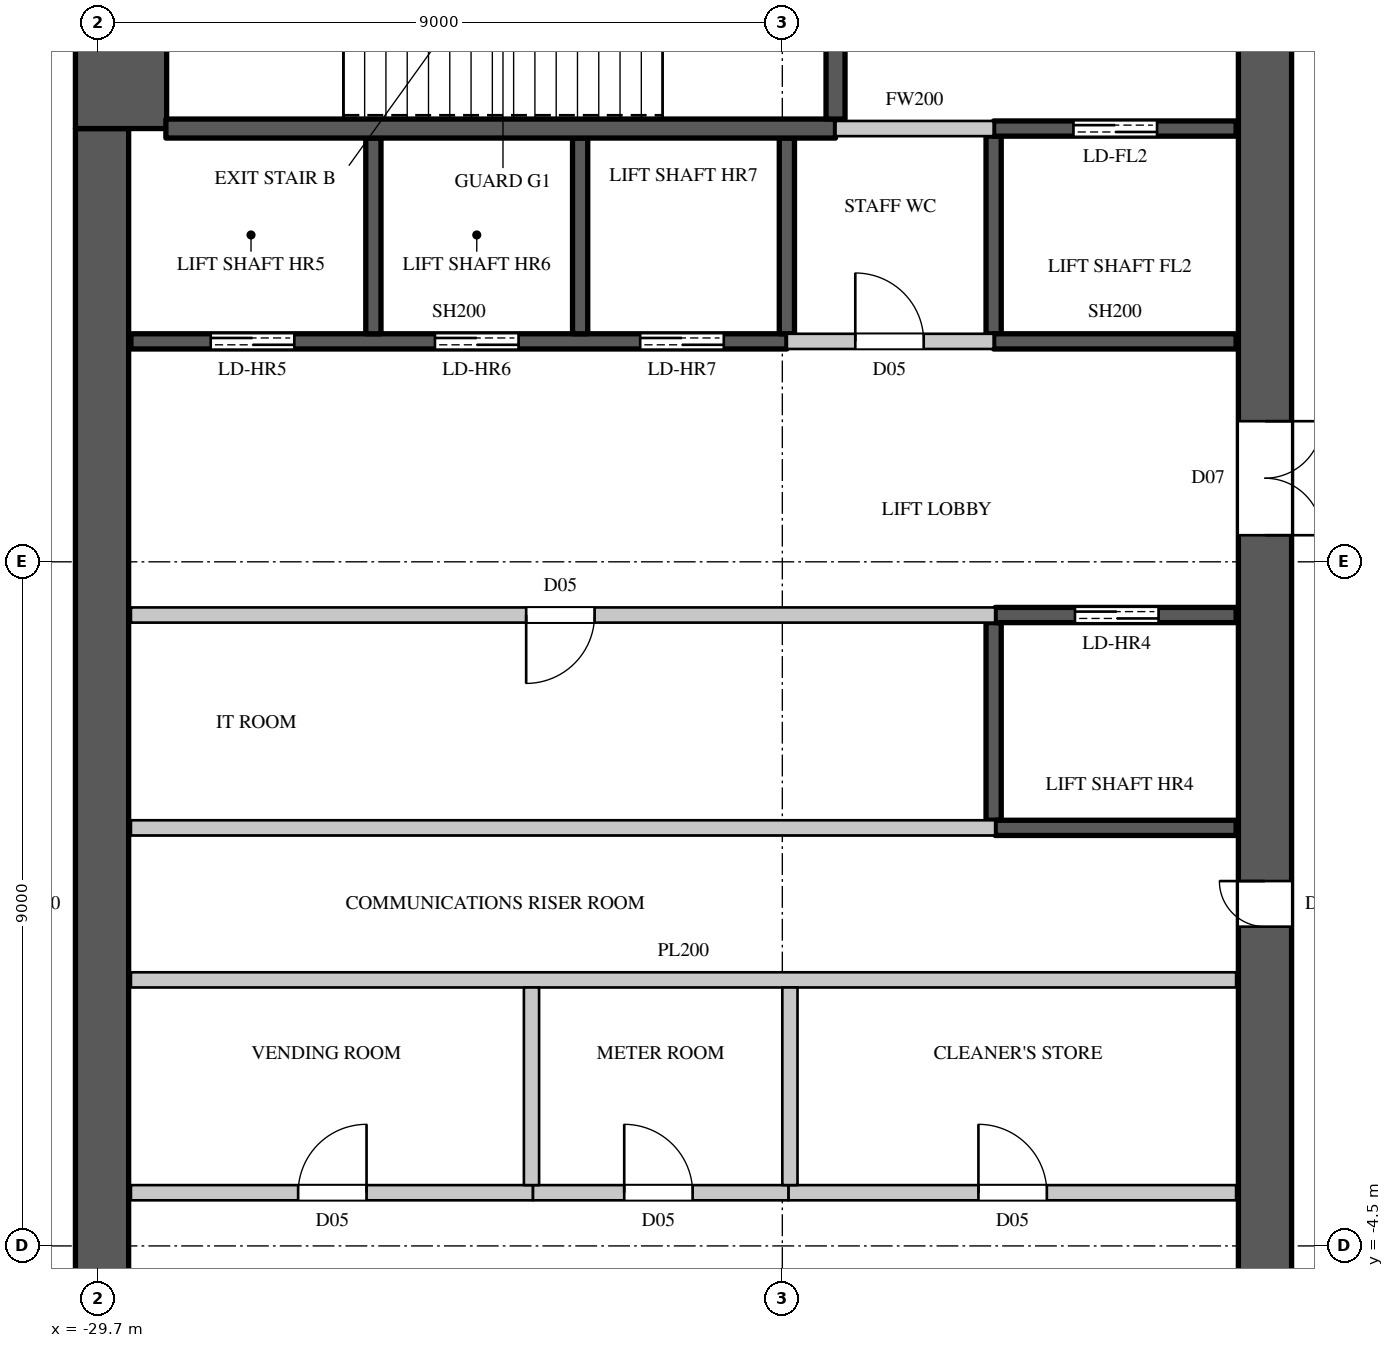
"""IFC4 building model, lengths in metres.
Left out: names, types, materials, properties, quantities, classifications, styles, units other than length and angle.
Written with IfcOpenShell. Run it as: python <this file> out.ifc"""

import sys

from ifc_helpers import new_model, si_unit, direction, frame, frame_2d, origin, place, context, subcontext, project, spatial, rectangle, extrude, element, fill, save


model = new_model("IFC4")
c1 = context("Model", 3, precision=1e-05, world=origin(), true_north=direction((0.0, 1.0)))
c2 = subcontext(c1, "Body", "Model", "MODEL_VIEW")
j1 = project(units=[si_unit("LENGTHUNIT", "METRE"), si_unit("PLANEANGLEUNIT", "RADIAN")], contexts=[c1])
p1 = place(None, origin())
s1 = spatial("IfcSite", under=j1, at=p1, CompositionType="ELEMENT")
p2 = place(p1, origin())
s2 = spatial("IfcBuilding", under=s1, at=p2, CompositionType="ELEMENT")
p3 = place(p2, frame((0.0, 0.0, 329.5)))
s3 = spatial("IfcBuildingStorey", under=s2, at=p3, CompositionType="ELEMENT", Elevation=329.5)
p4 = place(p3, frame((-14.35, -14.8, 0.0), z_axis=(0.0, 0.0, 1.0), x_axis=(0.0, 1.0, 0.0)))
e1 = element("IfcWall", 1, at=p4, inside=s3, PredefinedType="SHEAR", context=c2, shape_type="SweptSolid", body=[
    extrude(rectangle(XDim=29.6, YDim=0.7, at=frame_2d((14.8, 0.0))), origin(), (0.0, 0.0, 1.0), 5.5),
])
p5 = place(p4, frame((1.55, 0.0, 0.0)))
e2 = element("IfcOpeningElement", 2, at=p5, cuts=e1, PredefinedType="OPENING", context=c2, shape_type="SweptSolid", body=[
    extrude(rectangle(XDim=1.5, YDim=2.4, at=frame_2d((0.75, 1.2))), frame((0.0, 0.36, 0.0), z_axis=(0.0, -1.0, 0.0), x_axis=(1.0, 0.0, 0.0)), (0.0, 0.0, 1.0), 0.72),
])
p6 = place(p4, frame((26.55, 0.0, 0.0)))
e3 = element("IfcOpeningElement", 3, at=p6, cuts=e1, PredefinedType="OPENING", context=c2, shape_type="SweptSolid", body=[
    extrude(rectangle(XDim=1.5, YDim=2.4, at=frame_2d((0.75, 1.2))), frame((0.0, 0.36, 0.0), z_axis=(0.0, -1.0, 0.0), x_axis=(1.0, 0.0, 0.0)), (0.0, 0.0, 1.0), 0.72),
])
p7 = place(p4, frame((8.45, 0.0, 0.0)))
e4 = element("IfcOpeningElement", 4, at=p7, cuts=e1, PredefinedType="OPENING", context=c2, shape_type="SweptSolid", body=[
    extrude(rectangle(XDim=1.5, YDim=2.4, at=frame_2d((0.75, 1.2))), frame((0.0, 0.36, 0.0), z_axis=(0.0, -1.0, 0.0), x_axis=(1.0, 0.0, 0.0)), (0.0, 0.0, 1.0), 0.72),
])
p8 = place(p4, frame((19.65, 0.0, 0.0)))
e5 = element("IfcOpeningElement", 5, at=p8, cuts=e1, PredefinedType="OPENING", context=c2, shape_type="SweptSolid", body=[
    extrude(rectangle(XDim=1.5, YDim=2.4, at=frame_2d((0.75, 1.2))), frame((0.0, 0.36, 0.0), z_axis=(0.0, -1.0, 0.0), x_axis=(1.0, 0.0, 0.0)), (0.0, 0.0, 1.0), 0.72),
])
p9 = place(p4, frame((14.5, 0.0, 0.0)))
e6 = element("IfcOpeningElement", 6, at=p9, cuts=e1, PredefinedType="OPENING", context=c2, shape_type="SweptSolid", body=[
    extrude(rectangle(XDim=0.6, YDim=2.0, at=frame_2d((0.3, 1.0))), frame((0.0, 0.36, 0.0), z_axis=(0.0, -1.0, 0.0), x_axis=(1.0, 0.0, 0.0)), (0.0, 0.0, 1.0), 0.72),
])
p10 = place(p3, frame((-29.65, -10.2, 0.0), z_axis=(0.0, 0.0, 1.0), x_axis=(0.0, 1.0, 0.0)))
e7 = element("IfcWall", 7, at=p10, inside=s3, PredefinedType="SHEAR", context=c2, shape_type="SweptSolid", body=[
    extrude(rectangle(XDim=20.4, YDim=0.7, at=frame_2d((10.2, 0.0))), origin(), (0.0, 0.0, 1.0), 5.5),
])
p11 = place(p3, frame((-29.4, 10.2, 0.0), z_axis=(0.0, 0.0, 1.0), x_axis=(0.0, 1.0, 0.0)))
e8 = element("IfcWall", 8, at=p11, inside=s3, PredefinedType="SHEAR", context=c2, shape_type="SweptSolid", body=[
    extrude(rectangle(XDim=4.6, YDim=1.2, at=frame_2d((2.3, 0.0))), origin(), (0.0, 0.0, 1.0), 5.5),
])
p12 = place(p3, frame((-29.27, -3.8, 0.0), z_axis=(0.0, 0.0, 1.0), x_axis=(1.0, 0.0, 0.0)))
e9 = element("IfcWall", 9, at=p12, inside=s3, PredefinedType="PARTITIONING", context=c2, shape_type="SweptSolid", body=[
    extrude(rectangle(XDim=5.29, YDim=0.2, at=frame_2d((2.645, 0.0))), origin(), (0.0, 0.0, 1.0), 5.098),
])
p13 = place(p12, frame((2.2, 0.0, 0.0)))
e10 = element("IfcOpeningElement", 10, at=p13, cuts=e9, PredefinedType="OPENING", context=c2, shape_type="SweptSolid", body=[
    extrude(rectangle(XDim=0.9, YDim=2.2, at=frame_2d((0.45, 1.1))), frame((0.0, 0.11, 0.0), z_axis=(0.0, -1.0, 0.0), x_axis=(1.0, 0.0, 0.0)), (0.0, 0.0, 1.0), 0.22),
])
p14 = place(p3, frame((-20.64, 7.4, 0.0), z_axis=(0.0, 0.0, 1.0), x_axis=(1.0, 0.0, 0.0)))
e11 = element("IfcWall", 11, at=p14, inside=s3, PredefinedType="PARTITIONING", context=c2, shape_type="SweptSolid", body=[
    extrude(rectangle(XDim=2.72, YDim=0.2, at=frame_2d((1.36, 0.0))), origin(), (0.0, 0.0, 1.0), 5.098),
])
p15 = place(p14, frame((0.9, 0.0, 0.0)))
e12 = element("IfcOpeningElement", 12, at=p15, cuts=e11, PredefinedType="OPENING", context=c2, shape_type="SweptSolid", body=[
    extrude(rectangle(XDim=0.9, YDim=2.2, at=frame_2d((0.45, 1.1))), frame((0.0, 0.11, 0.0), z_axis=(0.0, -1.0, 0.0), x_axis=(1.0, 0.0, 0.0)), (0.0, 0.0, 1.0), 0.22),
])
p16 = place(p3, frame((-20.62, -3.8, 0.0), z_axis=(0.0, 0.0, 1.0), x_axis=(1.0, 0.0, 0.0)))
e13 = element("IfcWall", 13, at=p16, inside=s3, PredefinedType="PARTITIONING", context=c2, shape_type="SweptSolid", body=[
    extrude(rectangle(XDim=5.89, YDim=0.2, at=frame_2d((2.945, 0.0))), origin(), (0.0, 0.0, 1.0), 5.098),
])
p17 = place(p16, frame((2.5, 0.0, 0.0)))
e14 = element("IfcOpeningElement", 14, at=p17, cuts=e13, PredefinedType="OPENING", context=c2, shape_type="SweptSolid", body=[
    extrude(rectangle(XDim=0.9, YDim=2.2, at=frame_2d((0.45, 1.1))), frame((0.0, 0.11, 0.0), z_axis=(0.0, -1.0, 0.0), x_axis=(1.0, 0.0, 0.0)), (0.0, 0.0, 1.0), 0.22),
])
p18 = place(p3, frame((-20.0, 10.2, 0.0), z_axis=(0.0, 0.0, 1.0), x_axis=(1.0, 0.0, 0.0)))
e15 = element("IfcWall", 15, at=p18, inside=s3, PredefinedType="PARTITIONING", context=c2, shape_type="SweptSolid", body=[
    extrude(rectangle(XDim=2.08, YDim=0.2, at=frame_2d((1.04, 0.0))), origin(), (0.0, 0.0, 1.0), 5.098),
])
p19 = place(p3, frame((-29.27, -1.0, 0.0), z_axis=(0.0, 0.0, 1.0), x_axis=(1.0, 0.0, 0.0)))
e16 = element("IfcWall", 16, at=p19, inside=s3, PredefinedType="PARTITIONING", context=c2, shape_type="SweptSolid", body=[
    extrude(rectangle(XDim=14.54, YDim=0.2, at=frame_2d((7.27, 0.0))), origin(), (0.0, 0.0, 1.0), 5.098),
])
p20 = place(p3, frame((-29.27, 1.0, 0.0), z_axis=(0.0, 0.0, 1.0), x_axis=(1.0, 0.0, 0.0)))
e17 = element("IfcWall", 17, at=p20, inside=s3, PredefinedType="PARTITIONING", context=c2, shape_type="SweptSolid", body=[
    extrude(rectangle(XDim=11.37, YDim=0.2, at=frame_2d((5.685, 0.0))), origin(), (0.0, 0.0, 1.0), 5.098),
])
p21 = place(p3, frame((-29.27, 3.8, 0.0), z_axis=(0.0, 0.0, 1.0), x_axis=(1.0, 0.0, 0.0)))
e18 = element("IfcWall", 18, at=p21, inside=s3, PredefinedType="PARTITIONING", context=c2, shape_type="SweptSolid", body=[
    extrude(rectangle(XDim=11.37, YDim=0.2, at=frame_2d((5.685, 0.0))), origin(), (0.0, 0.0, 1.0), 5.098),
])
p22 = place(p21, frame((5.2, 0.0, 0.0)))
e19 = element("IfcOpeningElement", 19, at=p22, cuts=e18, PredefinedType="OPENING", context=c2, shape_type="SweptSolid", body=[
    extrude(rectangle(XDim=0.9, YDim=2.2, at=frame_2d((0.45, 1.1))), frame((0.0, 0.11, 0.0), z_axis=(0.0, -1.0, 0.0), x_axis=(1.0, 0.0, 0.0)), (0.0, 0.0, 1.0), 0.22),
])
p23 = place(p3, frame((-23.98, -3.8, 0.0), z_axis=(0.0, 0.0, 1.0), x_axis=(1.0, 0.0, 0.0)))
e20 = element("IfcWall", 20, at=p23, inside=s3, PredefinedType="PARTITIONING", context=c2, shape_type="SweptSolid", body=[
    extrude(rectangle(XDim=3.36, YDim=0.2, at=frame_2d((1.68, 0.0))), origin(), (0.0, 0.0, 1.0), 5.098),
])
p24 = place(p23, frame((1.2, 0.0, 0.0)))
e21 = element("IfcOpeningElement", 21, at=p24, cuts=e20, PredefinedType="OPENING", context=c2, shape_type="SweptSolid", body=[
    extrude(rectangle(XDim=0.9, YDim=2.2, at=frame_2d((0.45, 1.1))), frame((0.0, 0.11, 0.0), z_axis=(0.0, -1.0, 0.0), x_axis=(1.0, 0.0, 0.0)), (0.0, 0.0, 1.0), 0.22),
])
for number, where, z_axis, x_axis in (
    (22, (-24.0, -3.7, 0.0), (0.0, 0.0, 1.0), (0.0, 1.0, 0.0)),
    (23, (-20.6, -3.7, 0.0), (0.0, 0.0, 1.0), (0.0, 1.0, 0.0)),
):
    element("IfcWall", number, at=place(p3, frame(where, z_axis=z_axis, x_axis=x_axis)), inside=s3, PredefinedType="PARTITIONING", context=c2, shape_type="SweptSolid", body=[
        extrude(rectangle(XDim=2.6, YDim=0.2, at=frame_2d((1.3, 0.0))), origin(), (0.0, 0.0, 1.0), 5.098),
    ])
p25 = place(p3, frame((-29.27, 7.4, 0.0), z_axis=(0.0, 0.0, 1.0), x_axis=(1.0, 0.0, 0.0)))
e24 = element("IfcWall", 24, at=p25, inside=s3, PredefinedType="SHEAR", context=c2, shape_type="SweptSolid", body=[
    extrude(rectangle(XDim=8.63, YDim=0.2, at=frame_2d((4.315, 0.0))), origin(), (0.0, 0.0, 1.0), 5.098),
])
p26 = place(p25, frame((1.05, 0.0, 0.0)))
e25 = element("IfcOpeningElement", 25, at=p26, cuts=e24, PredefinedType="OPENING", context=c2, shape_type="SweptSolid", body=[
    extrude(rectangle(XDim=1.1, YDim=2.2, at=frame_2d((0.55, 1.1))), frame((0.0, 0.11, 0.0), z_axis=(0.0, -1.0, 0.0), x_axis=(1.0, 0.0, 0.0)), (0.0, 0.0, 1.0), 0.22),
])
p27 = place(p25, frame((4.0, 0.0, 0.0)))
e26 = element("IfcOpeningElement", 26, at=p27, cuts=e24, PredefinedType="OPENING", context=c2, shape_type="SweptSolid", body=[
    extrude(rectangle(XDim=1.1, YDim=2.2, at=frame_2d((0.55, 1.1))), frame((0.0, 0.11, 0.0), z_axis=(0.0, -1.0, 0.0), x_axis=(1.0, 0.0, 0.0)), (0.0, 0.0, 1.0), 0.22),
])
p28 = place(p25, frame((6.7, 0.0, 0.0)))
e27 = element("IfcOpeningElement", 27, at=p28, cuts=e24, PredefinedType="OPENING", context=c2, shape_type="SweptSolid", body=[
    extrude(rectangle(XDim=1.1, YDim=2.2, at=frame_2d((0.55, 1.1))), frame((0.0, 0.11, 0.0), z_axis=(0.0, -1.0, 0.0), x_axis=(1.0, 0.0, 0.0)), (0.0, 0.0, 1.0), 0.22),
])
for number, where, z_axis, x_axis in (
    (28, (-26.08, 7.5, 0.0), (0.0, 0.0, 1.0), (0.0, 1.0, 0.0)),
    (29, (-23.36, 7.5, 0.0), (0.0, 0.0, 1.0), (0.0, 1.0, 0.0)),
    (30, (-20.64, 7.5, 0.0), (0.0, 0.0, 1.0), (0.0, 1.0, 0.0)),
):
    element("IfcWall", number, at=place(p3, frame(where, z_axis=z_axis, x_axis=x_axis)), inside=s3, PredefinedType="SHEAR", context=c2, shape_type="SweptSolid", body=[
        extrude(rectangle(XDim=2.575, YDim=0.2, at=frame_2d((1.288, 0.0))), origin(), (0.0, 0.0, 1.0), 5.098),
    ])
p29 = place(p3, frame((-17.92, 1.1, 0.0), z_axis=(0.0, 0.0, 1.0), x_axis=(0.0, 1.0, 0.0)))
e31 = element("IfcWall", 31, at=p29, inside=s3, PredefinedType="SHEAR", context=c2, shape_type="SweptSolid", body=[
    extrude(rectangle(XDim=2.6, YDim=0.2, at=frame_2d((1.3, 0.0))), origin(), (0.0, 0.0, 1.0), 5.098),
])
p30 = place(p3, frame((-17.9, 1.0, 0.0), z_axis=(0.0, 0.0, 1.0), x_axis=(1.0, 0.0, 0.0)))
e32 = element("IfcWall", 32, at=p30, inside=s3, PredefinedType="SHEAR", context=c2, shape_type="SweptSolid", body=[
    extrude(rectangle(XDim=3.17, YDim=0.2, at=frame_2d((1.585, 0.0))), origin(), (0.0, 0.0, 1.0), 5.098),
])
p31 = place(p3, frame((-17.9, 3.8, 0.0), z_axis=(0.0, 0.0, 1.0), x_axis=(1.0, 0.0, 0.0)))
e33 = element("IfcWall", 33, at=p31, inside=s3, PredefinedType="SHEAR", context=c2, shape_type="SweptSolid", body=[
    extrude(rectangle(XDim=3.17, YDim=0.2, at=frame_2d((1.585, 0.0))), origin(), (0.0, 0.0, 1.0), 5.098),
])
p32 = place(p31, frame((1.05, 0.0, 0.0)))
e34 = element("IfcOpeningElement", 34, at=p32, cuts=e33, PredefinedType="OPENING", context=c2, shape_type="SweptSolid", body=[
    extrude(rectangle(XDim=1.1, YDim=2.2, at=frame_2d((0.55, 1.1))), frame((0.0, 0.11, 0.0), z_axis=(0.0, -1.0, 0.0), x_axis=(1.0, 0.0, 0.0)), (0.0, 0.0, 1.0), 0.22),
])
p33 = place(p3, frame((-17.92, 7.5, 0.0), z_axis=(0.0, 0.0, 1.0), x_axis=(0.0, 1.0, 0.0)))
e35 = element("IfcWall", 35, at=p33, inside=s3, PredefinedType="SHEAR", context=c2, shape_type="SweptSolid", body=[
    extrude(rectangle(XDim=2.6, YDim=0.2, at=frame_2d((1.3, 0.0))), origin(), (0.0, 0.0, 1.0), 5.098),
])
p34 = place(p3, frame((-17.92, 7.4, 0.0), z_axis=(0.0, 0.0, 1.0), x_axis=(1.0, 0.0, 0.0)))
e36 = element("IfcWall", 36, at=p34, inside=s3, PredefinedType="SHEAR", context=c2, shape_type="SweptSolid", body=[
    extrude(rectangle(XDim=3.19, YDim=0.2, at=frame_2d((1.595, 0.0))), origin(), (0.0, 0.0, 1.0), 5.098),
])
p35 = place(p3, frame((-17.92, 10.2, 0.0), z_axis=(0.0, 0.0, 1.0), x_axis=(1.0, 0.0, 0.0)))
e37 = element("IfcWall", 37, at=p35, inside=s3, PredefinedType="SHEAR", context=c2, shape_type="SweptSolid", body=[
    extrude(rectangle(XDim=3.19, YDim=0.2, at=frame_2d((1.595, 0.0))), origin(), (0.0, 0.0, 1.0), 5.098),
])
p36 = place(p35, frame((1.05, 0.0, 0.0)))
e38 = element("IfcOpeningElement", 38, at=p36, cuts=e37, PredefinedType="OPENING", context=c2, shape_type="SweptSolid", body=[
    extrude(rectangle(XDim=1.1, YDim=2.2, at=frame_2d((0.55, 1.1))), frame((0.0, 0.11, 0.0), z_axis=(0.0, -1.0, 0.0), x_axis=(1.0, 0.0, 0.0)), (0.0, 0.0, 1.0), 0.22),
])
p37 = place(p3, frame((-28.81, 10.2, 0.0), z_axis=(0.0, 0.0, 1.0), x_axis=(1.0, 0.0, 0.0)))
e39 = element("IfcWall", 39, at=p37, inside=s3, PredefinedType="SHEAR", context=c2, shape_type="SweptSolid", body=[
    extrude(rectangle(XDim=8.81, YDim=0.25, at=frame_2d((4.405, 0.0))), origin(), (0.0, 0.0, 1.0), 5.098),
])
p38 = place(p3, frame((-20.0, 10.325, 0.0), z_axis=(0.0, 0.0, 1.0), x_axis=(0.0, 1.0, 0.0)))
e40 = element("IfcWall", 40, at=p38, inside=s3, PredefinedType="SHEAR", context=c2, shape_type="SweptSolid", body=[
    extrude(rectangle(XDim=4.445, YDim=0.25, at=frame_2d((2.223, 0.0))), origin(), (0.0, 0.0, 1.0), 5.098),
])
p39 = place(p38, frame((1.65, 0.0, 0.0)))
e41 = element("IfcOpeningElement", 41, at=p39, cuts=e40, PredefinedType="OPENING", context=c2, shape_type="SweptSolid", body=[
    extrude(rectangle(XDim=1.1, YDim=2.2, at=frame_2d((0.55, 1.1))), frame((0.0, 0.135, 0.0), z_axis=(0.0, -1.0, 0.0), x_axis=(1.0, 0.0, 0.0)), (0.0, 0.0, 1.0), 0.27),
])
p40 = place(p13, origin())
e42 = element("IfcDoor", 42, at=p40, inside=s3, OperationType="SINGLE_SWING_RIGHT", PredefinedType="DOOR", context=c2, shape_type="SweptSolid", body=[
    extrude(rectangle(XDim=0.9, YDim=2.2, at=frame_2d((0.45, 1.1))), frame((0.0, 0.025, 0.0), z_axis=(0.0, -1.0, 0.0), x_axis=(1.0, 0.0, 0.0)), (0.0, 0.0, 1.0), 0.05),
])
fill(e10, e42)
p41 = place(p24, origin())
e43 = element("IfcDoor", 43, at=p41, inside=s3, OperationType="SINGLE_SWING_LEFT", PredefinedType="DOOR", context=c2, shape_type="SweptSolid", body=[
    extrude(rectangle(XDim=0.9, YDim=2.2, at=frame_2d((0.45, 1.1))), frame((0.0, 0.025, 0.0), z_axis=(0.0, -1.0, 0.0), x_axis=(1.0, 0.0, 0.0)), (0.0, 0.0, 1.0), 0.05),
])
fill(e21, e43)
p42 = place(p17, origin())
e44 = element("IfcDoor", 44, at=p42, inside=s3, OperationType="SINGLE_SWING_LEFT", PredefinedType="DOOR", context=c2, shape_type="SweptSolid", body=[
    extrude(rectangle(XDim=0.9, YDim=2.2, at=frame_2d((0.45, 1.1))), frame((0.0, 0.025, 0.0), z_axis=(0.0, -1.0, 0.0), x_axis=(1.0, 0.0, 0.0)), (0.0, 0.0, 1.0), 0.05),
])
fill(e14, e44)
p43 = place(p22, origin())
e45 = element("IfcDoor", 45, at=p43, inside=s3, OperationType="SINGLE_SWING_RIGHT", PredefinedType="DOOR", context=c2, shape_type="SweptSolid", body=[
    extrude(rectangle(XDim=0.9, YDim=2.2, at=frame_2d((0.45, 1.1))), frame((0.0, 0.025, 0.0), z_axis=(0.0, -1.0, 0.0), x_axis=(1.0, 0.0, 0.0)), (0.0, 0.0, 1.0), 0.05),
])
fill(e19, e45)
p44 = place(p15, origin())
e46 = element("IfcDoor", 46, at=p44, inside=s3, OperationType="SINGLE_SWING_LEFT", PredefinedType="DOOR", context=c2, shape_type="SweptSolid", body=[
    extrude(rectangle(XDim=0.9, YDim=2.2, at=frame_2d((0.45, 1.1))), frame((0.0, 0.025, 0.0), z_axis=(0.0, -1.0, 0.0), x_axis=(1.0, 0.0, 0.0)), (0.0, 0.0, 1.0), 0.05),
])
fill(e12, e46)
p45 = place(p32, origin())
e47 = element("IfcDoor", 47, at=p45, inside=s3, OperationType="DOUBLE_DOOR_SLIDING", PredefinedType="DOOR", context=c2, shape_type="SweptSolid", body=[
    extrude(rectangle(XDim=1.1, YDim=2.2, at=frame_2d((0.55, 1.1))), frame((0.0, 0.025, 0.0), z_axis=(0.0, -1.0, 0.0), x_axis=(1.0, 0.0, 0.0)), (0.0, 0.0, 1.0), 0.05),
])
fill(e34, e47)
p46 = place(p26, origin())
e48 = element("IfcDoor", 48, at=p46, inside=s3, OperationType="DOUBLE_DOOR_SLIDING", PredefinedType="DOOR", context=c2, shape_type="SweptSolid", body=[
    extrude(rectangle(XDim=1.1, YDim=2.2, at=frame_2d((0.55, 1.1))), frame((0.0, 0.025, 0.0), z_axis=(0.0, -1.0, 0.0), x_axis=(1.0, 0.0, 0.0)), (0.0, 0.0, 1.0), 0.05),
])
fill(e25, e48)
p47 = place(p27, origin())
e49 = element("IfcDoor", 49, at=p47, inside=s3, OperationType="DOUBLE_DOOR_SLIDING", PredefinedType="DOOR", context=c2, shape_type="SweptSolid", body=[
    extrude(rectangle(XDim=1.1, YDim=2.2, at=frame_2d((0.55, 1.1))), frame((0.0, 0.025, 0.0), z_axis=(0.0, -1.0, 0.0), x_axis=(1.0, 0.0, 0.0)), (0.0, 0.0, 1.0), 0.05),
])
fill(e26, e49)
p48 = place(p28, origin())
e50 = element("IfcDoor", 50, at=p48, inside=s3, OperationType="DOUBLE_DOOR_SLIDING", PredefinedType="DOOR", context=c2, shape_type="SweptSolid", body=[
    extrude(rectangle(XDim=1.1, YDim=2.2, at=frame_2d((0.55, 1.1))), frame((0.0, 0.025, 0.0), z_axis=(0.0, -1.0, 0.0), x_axis=(1.0, 0.0, 0.0)), (0.0, 0.0, 1.0), 0.05),
])
fill(e27, e50)
p49 = place(p36, origin())
e51 = element("IfcDoor", 51, at=p49, inside=s3, OperationType="DOUBLE_DOOR_SLIDING", PredefinedType="DOOR", context=c2, shape_type="SweptSolid", body=[
    extrude(rectangle(XDim=1.1, YDim=2.2, at=frame_2d((0.55, 1.1))), frame((0.0, 0.025, 0.0), z_axis=(0.0, -1.0, 0.0), x_axis=(1.0, 0.0, 0.0)), (0.0, 0.0, 1.0), 0.05),
])
fill(e38, e51)
p50 = place(p8, origin())
e52 = element("IfcDoor", 52, at=p50, inside=s3, OperationType="DOUBLE_DOOR_SINGLE_SWING", PredefinedType="DOOR", context=c2, shape_type="SweptSolid", body=[
    extrude(rectangle(XDim=1.5, YDim=2.4, at=frame_2d((0.75, 1.2))), frame((0.0, -0.295, 0.0), z_axis=(0.0, -1.0, 0.0), x_axis=(1.0, 0.0, 0.0)), (0.0, 0.0, 1.0), 0.05),
])
fill(e5, e52)
p51 = place(p9, origin())
e53 = element("IfcDoor", 53, at=p51, inside=s3, OperationType="SINGLE_SWING_RIGHT", PredefinedType="DOOR", context=c2, shape_type="SweptSolid", body=[
    extrude(rectangle(XDim=0.6, YDim=2.0, at=frame_2d((0.3, 1.0))), frame((0.0, 0.345, 0.0), z_axis=(0.0, -1.0, 0.0), x_axis=(1.0, 0.0, 0.0)), (0.0, 0.0, 1.0), 0.05),
])
fill(e6, e53)
save(model, sys.argv[1])
